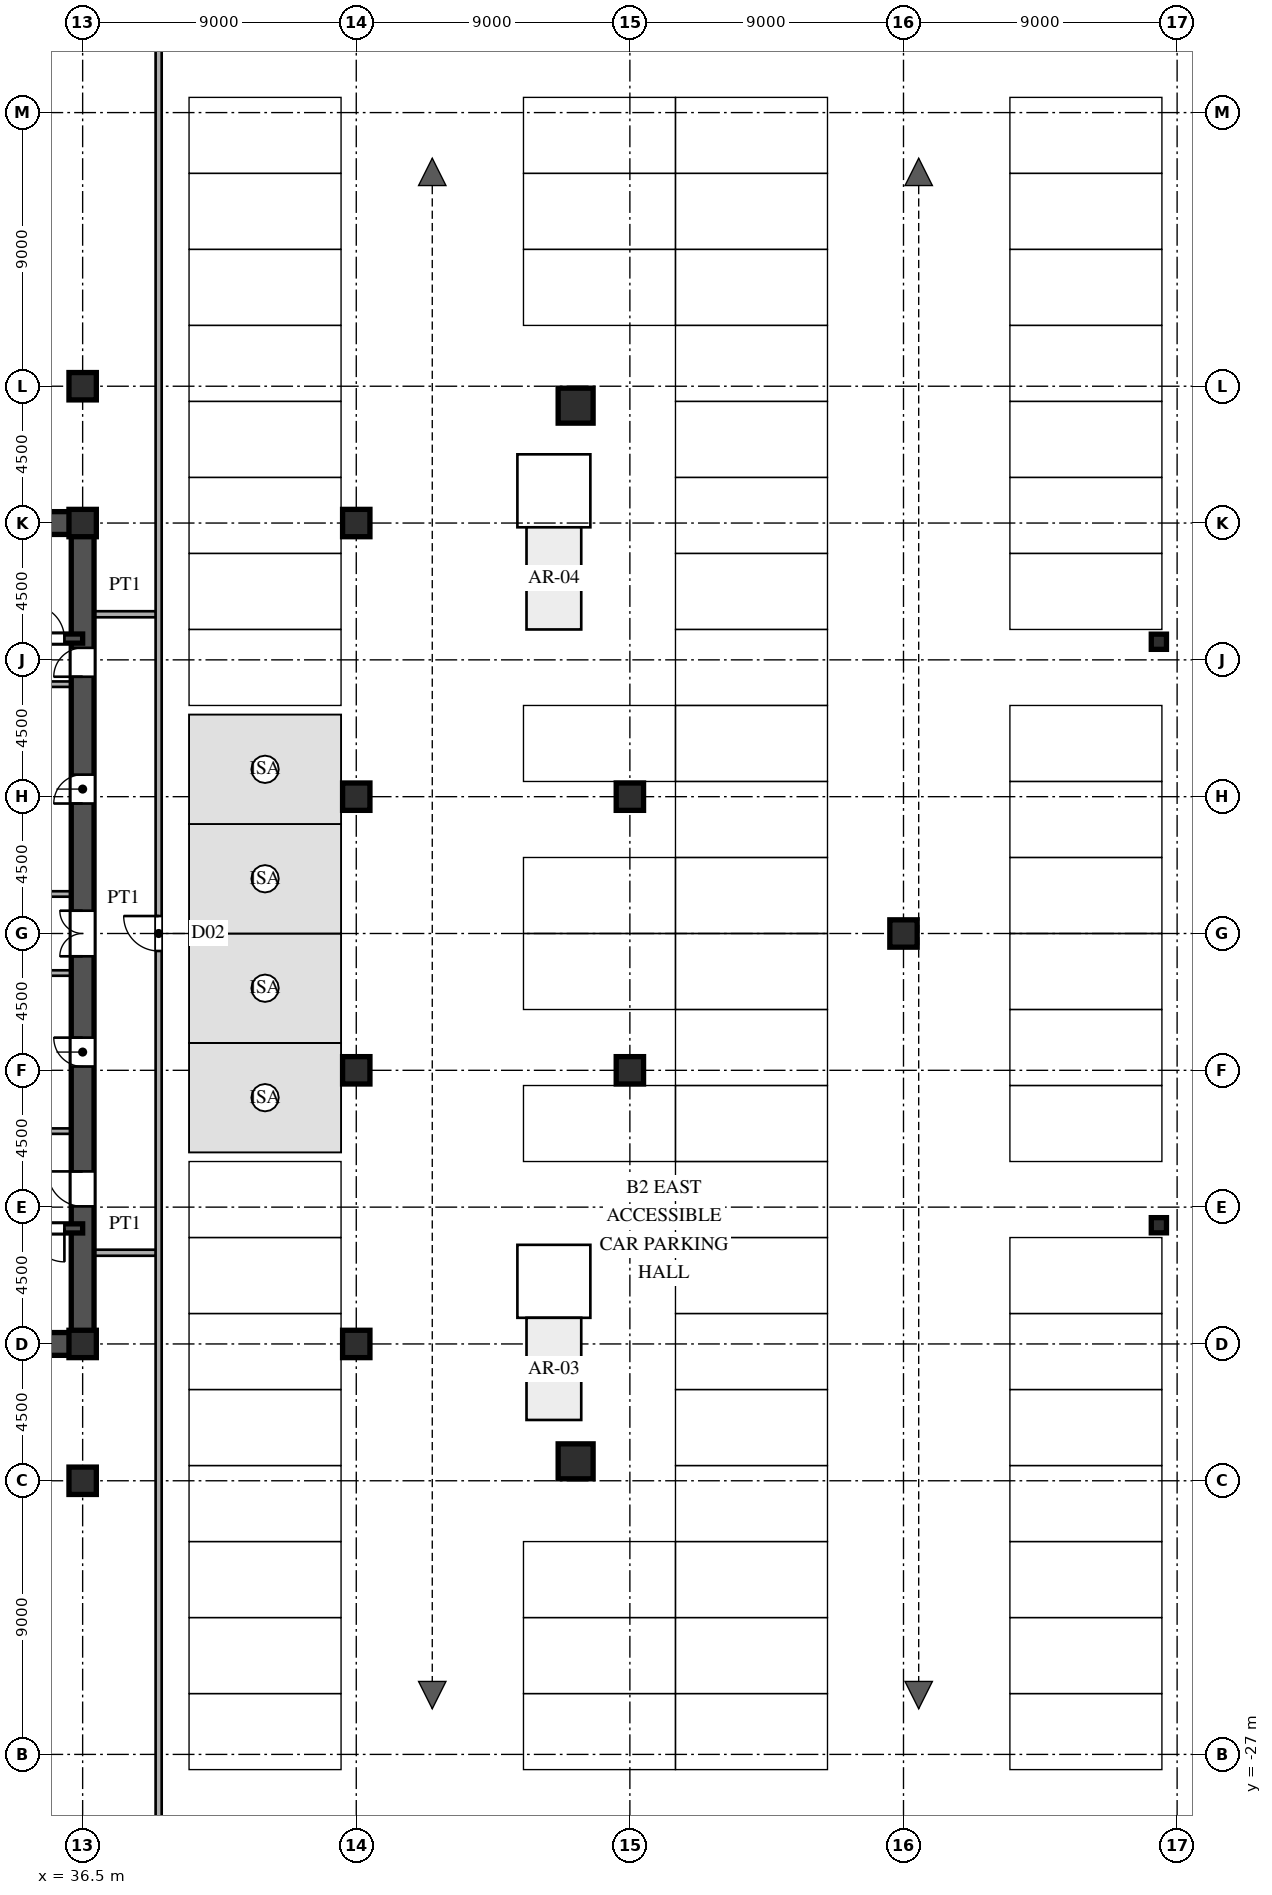
"""IFC4 building model, lengths in metres.
Left out: names, types, materials, properties, quantities, classifications, styles, units other than length and angle.
Written with IfcOpenShell. Run it as: python <this file> out.ifc"""

import sys

from ifc_helpers import new_model, si_unit, direction, frame, frame_2d, origin, origin_2d, place, context, subcontext, project, spatial, rectangle, hollow_rectangle, i_section, extrude, source, transform, mapped, element, fill, save


model = new_model("IFC4")
c1 = context("Model", 3, precision=1e-05, world=origin(), true_north=direction((0.0, 1.0)))
c2 = subcontext(c1, "Body", "Model", "MODEL_VIEW")
j1 = project(units=[si_unit("LENGTHUNIT", "METRE"), si_unit("PLANEANGLEUNIT", "RADIAN")], contexts=[c1])
p1 = place(None, origin())
s1 = spatial("IfcSite", under=j1, at=p1, CompositionType="ELEMENT")
p2 = place(p1, origin())
s2 = spatial("IfcBuilding", under=s1, at=p2, CompositionType="ELEMENT")
p3 = place(p2, frame((0.0, 0.0, -9.6)))
s3 = spatial("IfcBuildingStorey", under=s2, at=p3, CompositionType="ELEMENT", Elevation=-9.6)
m1 = source(origin(), c2, "Body", "SweptSolid", [
    extrude(i_section(OverallWidth=0.9, OverallDepth=0.9, WebThickness=0.036, FlangeThickness=0.055, at=origin_2d()), origin(), (0.0, 0.0, 1.0), 4.8),
])
for number, where, z_axis, x_axis in (
    (1, (36.5, -18.0, 0.0), (0.0, 0.0, 1.0), (1.0, 0.0, 0.0)),
    (2, (36.5, -13.5, 0.0), (0.0, 0.0, 1.0), (1.0, 0.0, 0.0)),
    (3, (36.5, 13.5, 0.0), (0.0, 0.0, 1.0), (1.0, 0.0, 0.0)),
    (4, (36.5, 18.0, 0.0), (0.0, 0.0, 1.0), (1.0, 0.0, 0.0)),
    (5, (45.5, -13.5, 0.0), (0.0, 0.0, 1.0), (1.0, 0.0, 0.0)),
    (6, (45.5, -4.5, 0.0), (0.0, 0.0, 1.0), (1.0, 0.0, 0.0)),
    (7, (45.5, 4.5, 0.0), (0.0, 0.0, 1.0), (1.0, 0.0, 0.0)),
    (8, (45.5, 13.5, 0.0), (0.0, 0.0, 1.0), (1.0, 0.0, 0.0)),
    (9, (54.5, -4.5, 0.0), (0.0, 0.0, 1.0), (1.0, 0.0, 0.0)),
    (10, (54.5, 4.5, 0.0), (0.0, 0.0, 1.0), (1.0, 0.0, 0.0)),
    (11, (63.5, 0.0, 0.0), (0.0, 0.0, 1.0), (1.0, 0.0, 0.0)),
):
    element("IfcColumn", number, at=place(p3, frame(where, z_axis=z_axis, x_axis=x_axis)), inside=s3, PredefinedType="COLUMN", context=c2, shape_type="MappedRepresentation", body=[
        mapped(m1, transform((0.0, 0.0, 0.0), scale=1.0)),
    ])
m2 = source(origin(), c2, "Body", "SweptSolid", [
    extrude(hollow_rectangle(XDim=0.5, YDim=0.5, WallThickness=0.02, at=origin_2d()), origin(), (0.0, 0.0, 1.0), 4.8),
])
for number, where, z_axis, x_axis in (
    (12, (71.9, -9.596, 0.0), (0.0, 0.0, 1.0), (1.0, 0.0, 0.0)),
    (13, (71.9, 9.596, 0.0), (0.0, 0.0, 1.0), (1.0, 0.0, 0.0)),
):
    element("IfcColumn", number, at=place(p3, frame(where, z_axis=z_axis, x_axis=x_axis)), inside=s3, PredefinedType="COLUMN", context=c2, shape_type="MappedRepresentation", body=[
        mapped(m2, transform((0.0, 0.0, 0.0), scale=1.0)),
    ])
m3 = source(origin(), c2, "Body", "SweptSolid", [
    extrude(hollow_rectangle(XDim=1.15, YDim=1.15, WallThickness=0.048, at=origin_2d()), origin(), (0.0, 0.0, 1.0), 4.8),
])
for number, where, z_axis, x_axis in (
    (14, (52.716, -17.361, 0.0), (0.0, 0.0, 1.0), (1.0, 0.0, 0.0)),
    (15, (52.716, 17.361, 0.0), (0.0, 0.0, 1.0), (1.0, 0.0, 0.0)),
):
    element("IfcColumn", number, at=place(p3, frame(where, z_axis=z_axis, x_axis=x_axis)), inside=s3, PredefinedType="COLUMN", context=c2, shape_type="MappedRepresentation", body=[
        mapped(m3, transform((0.0, 0.0, 0.0), scale=1.0)),
    ])
for number, where, z_axis, x_axis in (
    (16, (27.5, -13.5, 0.0), (0.0, 0.0, 1.0), (1.0, 0.0, 0.0)),
    (17, (27.5, 13.5, 0.0), (0.0, 0.0, 1.0), (1.0, 0.0, 0.0)),
):
    element("IfcWall", number, at=place(p3, frame(where, z_axis=z_axis, x_axis=x_axis)), inside=s3, PredefinedType="SHEAR", context=c2, shape_type="SweptSolid", body=[
        extrude(rectangle(XDim=9.0, YDim=0.75, at=frame_2d((4.5, 0.0))), origin(), (0.0, 0.0, 1.0), 4.5),
    ])
p4 = place(p3, frame((36.5, -13.65, 0.0), z_axis=(0.0, 0.0, 1.0), x_axis=(0.0, 1.0, 0.0)))
e18 = element("IfcWall", 18, at=p4, inside=s3, PredefinedType="SHEAR", context=c2, shape_type="SweptSolid", body=[
    extrude(rectangle(XDim=7.15, YDim=0.75, at=frame_2d((3.575, 0.0))), origin(), (0.0, 0.0, 1.0), 4.5),
])
p5 = place(p4, frame((4.675, 0.0, 0.0)))
e19 = element("IfcOpeningElement", 19, at=p5, cuts=e18, PredefinedType="OPENING", context=c2, shape_type="SweptSolid", body=[
    extrude(rectangle(XDim=1.15, YDim=2.2, at=frame_2d((0.575, 1.1))), frame((0.0, 0.385, 0.0), z_axis=(0.0, -1.0, 0.0), x_axis=(1.0, 0.0, 0.0)), (0.0, 0.0, 1.0), 0.77),
])
p6 = place(p3, frame((36.5, -1.3, 0.0), z_axis=(0.0, 0.0, 1.0), x_axis=(0.0, 1.0, 0.0)))
e20 = element("IfcWall", 20, at=p6, inside=s3, PredefinedType="SHEAR", context=c2, shape_type="SweptSolid", body=[
    extrude(rectangle(XDim=2.6, YDim=0.75, at=frame_2d((1.3, 0.0))), origin(), (0.0, 0.0, 1.0), 4.5),
])
p7 = place(p6, frame((0.55, 0.0, 0.0)))
e21 = element("IfcOpeningElement", 21, at=p7, cuts=e20, PredefinedType="OPENING", context=c2, shape_type="SweptSolid", body=[
    extrude(rectangle(XDim=1.5, YDim=2.3, at=frame_2d((0.75, 1.15))), frame((0.0, 0.385, 0.0), z_axis=(0.0, -1.0, 0.0), x_axis=(1.0, 0.0, 0.0)), (0.0, 0.0, 1.0), 0.77),
])
p8 = place(p3, frame((36.5, 8.2, 0.0), z_axis=(0.0, 0.0, 1.0), x_axis=(0.0, 1.0, 0.0)))
e22 = element("IfcWall", 22, at=p8, inside=s3, PredefinedType="SHEAR", context=c2, shape_type="SweptSolid", body=[
    extrude(rectangle(XDim=5.45, YDim=0.75, at=frame_2d((2.725, 0.0))), origin(), (0.0, 0.0, 1.0), 4.5),
])
p9 = place(p8, frame((0.245, 0.0, 0.0)))
e23 = element("IfcOpeningElement", 23, at=p9, cuts=e22, PredefinedType="OPENING", context=c2, shape_type="SweptSolid", body=[
    extrude(rectangle(XDim=0.95, YDim=2.15, at=frame_2d((0.475, 1.075))), frame((0.0, 0.385, 0.0), z_axis=(0.0, -1.0, 0.0), x_axis=(1.0, 0.0, 0.0)), (0.0, 0.0, 1.0), 0.77),
])
p10 = place(p3, frame((36.5, -6.5, 0.0), z_axis=(0.0, 0.0, 1.0), x_axis=(0.0, 1.0, 0.0)))
e24 = element("IfcWall", 24, at=p10, inside=s3, PredefinedType="SHEAR", context=c2, shape_type="SweptSolid", body=[
    extrude(rectangle(XDim=5.2, YDim=0.75, at=frame_2d((2.6, 0.0))), origin(), (0.0, 0.0, 1.0), 4.5),
])
p11 = place(p10, frame((2.125, 0.0, 0.0)))
e25 = element("IfcOpeningElement", 25, at=p11, cuts=e24, PredefinedType="OPENING", context=c2, shape_type="SweptSolid", body=[
    extrude(rectangle(XDim=0.95, YDim=2.15, at=frame_2d((0.475, 1.075))), frame((0.0, 0.385, 0.0), z_axis=(0.0, -1.0, 0.0), x_axis=(1.0, 0.0, 0.0)), (0.0, 0.0, 1.0), 0.77),
])
p12 = place(p3, frame((36.5, 1.3, 0.0), z_axis=(0.0, 0.0, 1.0), x_axis=(0.0, 1.0, 0.0)))
e26 = element("IfcWall", 26, at=p12, inside=s3, PredefinedType="SHEAR", context=c2, shape_type="SweptSolid", body=[
    extrude(rectangle(XDim=6.9, YDim=0.75, at=frame_2d((3.45, 0.0))), origin(), (0.0, 0.0, 1.0), 4.5),
])
p13 = place(p12, frame((2.975, 0.0, 0.0)))
e27 = element("IfcOpeningElement", 27, at=p13, cuts=e26, PredefinedType="OPENING", context=c2, shape_type="SweptSolid", body=[
    extrude(rectangle(XDim=0.95, YDim=2.15, at=frame_2d((0.475, 1.075))), frame((0.0, 0.385, 0.0), z_axis=(0.0, -1.0, 0.0), x_axis=(1.0, 0.0, 0.0)), (0.0, 0.0, 1.0), 0.77),
])
p14 = place(p3, frame((27.5, -9.7, 0.0), z_axis=(0.0, 0.0, 1.0), x_axis=(1.0, 0.0, 0.0)))
e28 = element("IfcWall", 28, at=p14, inside=s3, PredefinedType="SHEAR", context=c2, shape_type="SweptSolid", body=[
    extrude(rectangle(XDim=9.0, YDim=0.3, at=frame_2d((4.5, 0.0))), origin(), (0.0, 0.0, 1.0), 4.5),
])
p15 = place(p14, frame((7.3, 0.0, 0.0)))
e29 = element("IfcOpeningElement", 29, at=p15, cuts=e28, PredefinedType="OPENING", context=c2, shape_type="SweptSolid", body=[
    extrude(rectangle(XDim=1.1, YDim=2.2, at=frame_2d((0.55, 1.1))), frame((0.0, 0.16, 0.0), z_axis=(0.0, -1.0, 0.0), x_axis=(1.0, 0.0, 0.0)), (0.0, 0.0, 1.0), 0.32),
])
p16 = place(p3, frame((27.5, 9.7, 0.0), z_axis=(0.0, 0.0, 1.0), x_axis=(1.0, 0.0, 0.0)))
e30 = element("IfcWall", 30, at=p16, inside=s3, PredefinedType="SHEAR", context=c2, shape_type="SweptSolid", body=[
    extrude(rectangle(XDim=9.0, YDim=0.3, at=frame_2d((4.5, 0.0))), origin(), (0.0, 0.0, 1.0), 4.5),
])
p17 = place(p16, frame((7.3, 0.0, 0.0)))
e31 = element("IfcOpeningElement", 31, at=p17, cuts=e30, PredefinedType="OPENING", context=c2, shape_type="SweptSolid", body=[
    extrude(rectangle(XDim=1.1, YDim=2.2, at=frame_2d((0.55, 1.1))), frame((0.0, 0.16, 0.0), z_axis=(0.0, -1.0, 0.0), x_axis=(1.0, 0.0, 0.0)), (0.0, 0.0, 1.0), 0.32),
])
for number, where, z_axis, x_axis in (
    (32, (30.45, -6.5, 0.0), (0.0, 0.0, 1.0), (1.0, 0.0, 0.0)),
    (33, (30.45, 8.2, 0.0), (0.0, 0.0, 1.0), (1.0, 0.0, 0.0)),
):
    element("IfcWall", number, at=place(p3, frame(where, z_axis=z_axis, x_axis=x_axis)), inside=s3, PredefinedType="PARTITIONING", context=c2, shape_type="SweptSolid", body=[
        extrude(rectangle(XDim=5.7, YDim=0.18, at=frame_2d((2.85, 0.0))), origin(), (0.0, 0.0, 1.0), 4.5),
    ])
for number, where, z_axis, x_axis in (
    (34, (33.2, -1.3, 0.0), (0.0, 0.0, 1.0), (1.0, 0.0, 0.0)),
    (35, (33.2, 1.3, 0.0), (0.0, 0.0, 1.0), (1.0, 0.0, 0.0)),
):
    element("IfcWall", number, at=place(p3, frame(where, z_axis=z_axis, x_axis=x_axis)), inside=s3, PredefinedType="PARTITIONING", context=c2, shape_type="SweptSolid", body=[
        extrude(rectangle(XDim=2.95, YDim=0.18, at=frame_2d((1.475, 0.0))), origin(), (0.0, 0.0, 1.0), 4.5),
    ])
for number, where, z_axis, x_axis in (
    (36, (36.88, -10.5, 0.0), (0.0, 0.0, 1.0), (1.0, 0.0, 0.0)),
    (37, (36.88, 10.5, 0.0), (0.0, 0.0, 1.0), (1.0, 0.0, 0.0)),
):
    element("IfcWall", number, at=place(p3, frame(where, z_axis=z_axis, x_axis=x_axis)), inside=s3, PredefinedType="PARTITIONING", context=c2, shape_type="SweptSolid", body=[
        extrude(rectangle(XDim=2.035, YDim=0.2, at=frame_2d((1.018, 0.0))), origin(), (0.0, 0.0, 1.0), 4.5),
    ])
p18 = place(p3, frame((39.0, -35.77, 0.0), z_axis=(0.0, 0.0, 1.0), x_axis=(0.0, 1.0, 0.0)))
e38 = element("IfcWall", 38, at=p18, inside=s3, PredefinedType="PARTITIONING", context=c2, shape_type="SweptSolid", body=[
    extrude(rectangle(XDim=71.54, YDim=0.2, at=frame_2d((35.77, 0.0))), origin(), (0.0, 0.0, 1.0), 4.5),
])
p19 = place(p18, frame((35.195, 0.0, 0.0)))
e39 = element("IfcOpeningElement", 39, at=p19, cuts=e38, PredefinedType="OPENING", context=c2, shape_type="SweptSolid", body=[
    extrude(rectangle(XDim=1.15, YDim=2.2, at=frame_2d((0.575, 1.1))), frame((0.0, 0.11, 0.0), z_axis=(0.0, -1.0, 0.0), x_axis=(1.0, 0.0, 0.0)), (0.0, 0.0, 1.0), 0.22),
])
m4 = source(origin(), c2, "Body", "SweptSolid", [
    extrude(rectangle(XDim=1.15, YDim=2.2, at=frame_2d((0.575, 1.1))), frame((0.0, 0.025, 0.0), z_axis=(0.0, -1.0, 0.0), x_axis=(1.0, 0.0, 0.0)), (0.0, 0.0, 1.0), 0.05),
])
p20 = place(p5, origin())
e40 = element("IfcDoor", 40, at=p20, inside=s3, OperationType="SINGLE_SWING_RIGHT", PredefinedType="DOOR", context=c2, shape_type="MappedRepresentation", body=[
    mapped(m4, transform((0.0, 0.0, 0.0), scale=1.0)),
])
fill(e19, e40)
m5 = source(origin(), c2, "Body", "SweptSolid", [
    extrude(rectangle(XDim=1.5, YDim=2.3, at=frame_2d((0.75, 1.15))), frame((0.0, 0.025, 0.0), z_axis=(0.0, -1.0, 0.0), x_axis=(1.0, 0.0, 0.0)), (0.0, 0.0, 1.0), 0.05),
])
p21 = place(p7, origin())
e41 = element("IfcDoor", 41, at=p21, inside=s3, OperationType="DOUBLE_SWING_LEFT", PredefinedType="DOOR", context=c2, shape_type="MappedRepresentation", body=[
    mapped(m5, transform((0.0, 0.0, 0.0), scale=1.0)),
])
fill(e21, e41)
m6 = source(origin(), c2, "Body", "SweptSolid", [
    extrude(rectangle(XDim=0.95, YDim=2.15, at=frame_2d((0.475, 1.075))), frame((0.0, 0.025, 0.0), z_axis=(0.0, -1.0, 0.0), x_axis=(1.0, 0.0, 0.0)), (0.0, 0.0, 1.0), 0.05),
])
p22 = place(p9, origin())
e42 = element("IfcDoor", 42, at=p22, inside=s3, OperationType="SINGLE_SWING_LEFT", PredefinedType="DOOR", context=c2, shape_type="MappedRepresentation", body=[
    mapped(m6, transform((0.0, 0.0, 0.0), scale=1.0)),
])
fill(e23, e42)
p23 = place(p11, origin())
e43 = element("IfcDoor", 43, at=p23, inside=s3, OperationType="SINGLE_SWING_RIGHT", PredefinedType="DOOR", context=c2, shape_type="MappedRepresentation", body=[
    mapped(m6, transform((0.0, 0.0, 0.0), scale=1.0)),
])
fill(e25, e43)
p24 = place(p13, origin())
e44 = element("IfcDoor", 44, at=p24, inside=s3, OperationType="SINGLE_SWING_LEFT", PredefinedType="DOOR", context=c2, shape_type="MappedRepresentation", body=[
    mapped(m6, transform((0.0, 0.0, 0.0), scale=1.0)),
])
fill(e27, e44)
m7 = source(origin(), c2, "Body", "SweptSolid", [
    extrude(rectangle(XDim=1.1, YDim=2.2, at=frame_2d((0.55, 1.1))), frame((0.0, 0.025, 0.0), z_axis=(0.0, -1.0, 0.0), x_axis=(1.0, 0.0, 0.0)), (0.0, 0.0, 1.0), 0.05),
])
p25 = place(p15, frame((1.1, 0.0, 0.0), z_axis=(0.0, 0.0, 1.0), x_axis=(-1.0, 0.0, 0.0)))
e45 = element("IfcDoor", 45, at=p25, inside=s3, OperationType="SINGLE_SWING_RIGHT", PredefinedType="DOOR", context=c2, shape_type="MappedRepresentation", body=[
    mapped(m7, transform((0.0, 0.0, 0.0), scale=1.0)),
])
fill(e29, e45)
p26 = place(p17, origin())
e46 = element("IfcDoor", 46, at=p26, inside=s3, OperationType="SINGLE_SWING_LEFT", PredefinedType="DOOR", context=c2, shape_type="MappedRepresentation", body=[
    mapped(m7, transform((0.0, 0.0, 0.0), scale=1.0)),
])
fill(e31, e46)
p27 = place(p19, origin())
e47 = element("IfcDoor", 47, at=p27, inside=s3, OperationType="SINGLE_SWING_RIGHT", PredefinedType="DOOR", context=c2, shape_type="MappedRepresentation", body=[
    mapped(m4, transform((0.0, 0.0, 0.0), scale=1.0)),
])
fill(e39, e47)
save(model, sys.argv[1])
